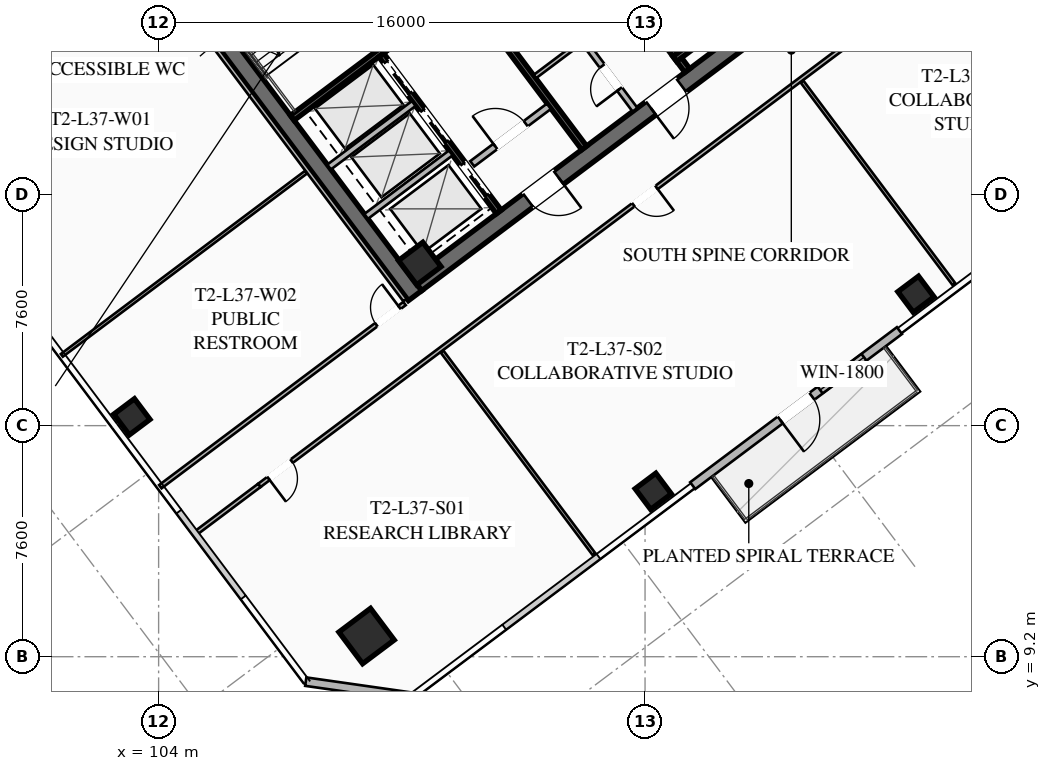
"""IFC4 building model, lengths in metres.
Left out: names, types, materials, properties, quantities, classifications, styles, units other than length and angle.
Written with IfcOpenShell. Run it as: python <this file> out.ifc"""

import sys

from ifc_helpers import new_model, si_unit, direction, frame, frame_2d, origin, origin_2d, place, context, subcontext, project, spatial, rectangle, hollow_rectangle, extrude, element, fill, save


model = new_model("IFC4")
c1 = context("Model", 3, precision=1e-05, world=origin(), true_north=direction((0.0, 1.0)))
c2 = subcontext(c1, "Body", "Model", "MODEL_VIEW")
j1 = project(units=[si_unit("LENGTHUNIT", "METRE"), si_unit("PLANEANGLEUNIT", "RADIAN")], contexts=[c1])
p1 = place(None, origin())
s1 = spatial("IfcSite", under=j1, at=p1, CompositionType="ELEMENT")
p2 = place(p1, origin())
s2 = spatial("IfcBuilding", under=s1, at=p2, CompositionType="ELEMENT")
p3 = place(p2, frame((0.0, 0.0, 139.25)))
s3 = spatial("IfcBuildingStorey", under=s2, at=p3, CompositionType="ELEMENT", Elevation=139.25)
p4 = place(p3, frame((112.436, 21.077, 0.0), z_axis=(0.0, 0.0, 1.0), x_axis=(-0.600005007985, 0.799996243986, 0.0)))
e1 = element("IfcWall", 1, at=p4, inside=s3, PredefinedType="SHEAR", context=c2, shape_type="SweptSolid", body=[
    extrude(rectangle(XDim=15.6, YDim=0.55, at=frame_2d((7.8, 0.0))), origin(), (0.0, 0.0, 1.0), 3.55),
])
p5 = place(p3, frame((124.539, 30.498, 0.0), z_axis=(0.0, 0.0, 1.0), x_axis=(-0.799998054672, -0.600002593761, 0.0)))
e2 = element("IfcWall", 2, at=p5, inside=s3, PredefinedType="SHEAR", context=c2, shape_type="SweptSolid", body=[
    extrude(rectangle(XDim=15.06, YDim=0.55, at=frame_2d((7.53, 0.0))), origin(), (0.0, 0.0, 1.0), 3.55),
])
p6 = place(p5, frame((9.23, 0.0, 0.0)))
e3 = element("IfcOpeningElement", 3, at=p6, cuts=e2, PredefinedType="OPENING", context=c2, shape_type="SweptSolid", body=[
    extrude(rectangle(XDim=1.25, YDim=2.25, at=frame_2d((0.625, 1.125))), frame((0.0, 0.285, 0.0), z_axis=(0.0, -1.0, 0.0), x_axis=(1.0, 0.0, 0.0)), (0.0, 0.0, 1.0), 0.57),
])
p7 = place(p5, frame((4.18, 0.0, 0.0)))
e4 = element("IfcOpeningElement", 4, at=p7, cuts=e2, PredefinedType="OPENING", context=c2, shape_type="SweptSolid", body=[
    extrude(rectangle(XDim=1.25, YDim=2.25, at=frame_2d((0.625, 1.125))), frame((0.0, 0.285, 0.0), z_axis=(0.0, -1.0, 0.0), x_axis=(1.0, 0.0, 0.0)), (0.0, 0.0, 1.0), 0.57),
])
p8 = place(p3, frame((112.59, 22.13, 0.0), z_axis=(0.0, 0.0, 1.0), x_axis=(0.799999996291, 0.600000004945, 0.0)))
e5 = element("IfcColumn", 5, at=p8, inside=s3, PredefinedType="COLUMN", context=c2, shape_type="SweptSolid", body=[
    extrude(hollow_rectangle(XDim=1.0, YDim=1.0, WallThickness=0.04, at=origin_2d()), origin(), (0.0, 0.0, 1.0), 3.37),
])
p9 = place(p3, frame((110.84, 9.88, 0.0), z_axis=(0.0, 0.0, 1.0), x_axis=(0.799999996291, 0.600000004945, 0.0)))
e6 = element("IfcColumn", 6, at=p9, inside=s3, PredefinedType="COLUMN", context=c2, shape_type="SweptSolid", body=[
    extrude(hollow_rectangle(XDim=1.3, YDim=1.3, WallThickness=0.05, at=origin_2d()), origin(), (0.0, 0.0, 1.0), 3.37),
])
for number, where, z_axis, x_axis in (
    (7, (120.27, 14.64, 0.0), (0.0, 0.0, 1.0), (0.8, 0.6, 0.0)),
    (8, (128.91, 21.12, 0.0), (0.0, 0.0, 1.0), (0.8, 0.6, 0.0)),
    (9, (103.12, 17.09, 0.0), (0.0, 0.0, 1.0), (0.8, 0.6, 0.0)),
):
    element("IfcColumn", number, at=place(p3, frame(where, z_axis=z_axis, x_axis=x_axis)), inside=s3, PredefinedType="COLUMN", context=c2, shape_type="SweptSolid", body=[
        extrude(hollow_rectangle(XDim=0.85, YDim=0.85, WallThickness=0.035, at=origin_2d()), origin(), (0.0, 0.0, 1.0), 3.37),
    ])
p10 = place(p3, frame((128.368, 19.926, 0.0), z_axis=(0.0, 0.0, 1.0), x_axis=(-0.799986212866, -0.600018382406, 0.0)))
e10 = element("IfcWall", 10, at=p10, inside=s3, PredefinedType="SOLIDWALL", context=c2, shape_type="SweptSolid", body=[
    extrude(rectangle(XDim=8.5, YDim=0.28, at=frame_2d((4.25, 0.0))), origin(), (0.0, 0.0, 1.0), 3.37),
])
p11 = place(p10, frame((3.6, 0.0, 0.0)))
e11 = element("IfcOpeningElement", 11, at=p11, cuts=e10, PredefinedType="OPENING", context=c2, shape_type="SweptSolid", body=[
    extrude(rectangle(XDim=1.3, YDim=2.15, at=frame_2d((0.65, 1.075))), frame((0.0, 0.15, 0.0), z_axis=(0.0, -1.0, 0.0), x_axis=(1.0, 0.0, 0.0)), (0.0, 0.0, 1.0), 0.3),
])
p12 = place(p10, frame((1.46, 0.0, 0.85)))
e12 = element("IfcOpeningElement", 12, at=p12, cuts=e10, PredefinedType="OPENING", context=c2, shape_type="SweptSolid", body=[
    extrude(rectangle(XDim=1.8, YDim=1.92, at=frame_2d((0.9, 0.96))), frame((0.0, 0.15, 0.0), z_axis=(0.0, -1.0, 0.0), x_axis=(1.0, 0.0, 0.0)), (0.0, 0.0, 1.0), 0.3),
])
p13 = place(p3, frame((112.34, 7.88, 0.0), z_axis=(0.0, 0.0, 1.0), x_axis=(-0.989949493661, 0.141421356237, 0.0)))
e13 = element("IfcWall", 13, at=p13, inside=s3, PredefinedType="SOLIDWALL", context=c2, shape_type="SweptSolid", body=[
    extrude(rectangle(XDim=3.536, YDim=0.28, at=frame_2d((1.768, 0.0))), origin(), (0.0, 0.0, 1.0), 3.37),
])
p14 = place(p3, frame((111.44, 29.08, 0.0), z_axis=(0.0, 0.0, 1.0), x_axis=(-0.59999029481, 0.8000072788, 0.0)))
e14 = element("IfcWall", 14, at=p14, inside=s3, PredefinedType="SHEAR", context=c2, shape_type="SweptSolid", body=[
    extrude(rectangle(XDim=8.05, YDim=0.2, at=frame_2d((4.025, 0.0))), origin(), (0.0, 0.0, 1.0), 3.37),
])
p15 = place(p14, frame((0.45, 0.0, 0.0)))
e15 = element("IfcOpeningElement", 15, at=p15, cuts=e14, PredefinedType="OPENING", context=c2, shape_type="SweptSolid", body=[
    extrude(rectangle(XDim=1.15, YDim=2.2, at=frame_2d((0.575, 1.1))), frame((0.0, 0.11, 0.0), z_axis=(0.0, -1.0, 0.0), x_axis=(1.0, 0.0, 0.0)), (0.0, 0.0, 1.0), 0.22),
])
p16 = place(p3, frame((108.396, 26.922, 0.0), z_axis=(0.0, 0.0, 1.0), x_axis=(0.800015298837, 0.599979601008, 0.0)))
e16 = element("IfcWall", 16, at=p16, inside=s3, PredefinedType="SHEAR", context=c2, shape_type="SweptSolid", body=[
    extrude(rectangle(XDim=3.83, YDim=0.2, at=frame_2d((1.915, 0.0))), origin(), (0.0, 0.0, 1.0), 3.37),
])
p17 = place(p3, frame((116.56, 34.92, 0.0), z_axis=(0.0, 0.0, 1.0), x_axis=(0.59999029481, -0.8000072788, 0.0)))
e17 = element("IfcWall", 17, at=p17, inside=s3, PredefinedType="SHEAR", context=c2, shape_type="SweptSolid", body=[
    extrude(rectangle(XDim=8.05, YDim=0.2, at=frame_2d((4.025, 0.0))), origin(), (0.0, 0.0, 1.0), 3.37),
])
p18 = place(p17, frame((0.45, 0.0, 0.0)))
e18 = element("IfcOpeningElement", 18, at=p18, cuts=e17, PredefinedType="OPENING", context=c2, shape_type="SweptSolid", body=[
    extrude(rectangle(XDim=1.15, YDim=2.2, at=frame_2d((0.575, 1.1))), frame((0.0, 0.11, 0.0), z_axis=(0.0, -1.0, 0.0), x_axis=(1.0, 0.0, 0.0)), (0.0, 0.0, 1.0), 0.22),
])
p19 = place(p3, frame((120.98, 28.86, 0.0), z_axis=(0.0, 0.0, 1.0), x_axis=(0.800015298837, 0.599979601008, 0.0)))
e19 = element("IfcWall", 19, at=p19, inside=s3, PredefinedType="SHEAR", context=c2, shape_type="SweptSolid", body=[
    extrude(rectangle(XDim=3.83, YDim=0.2, at=frame_2d((1.915, 0.0))), origin(), (0.0, 0.0, 1.0), 3.37),
])
p20 = place(p3, frame((117.998, 25.936, 0.0), z_axis=(0.0, 0.0, 1.0), x_axis=(-0.600002693989, 0.799997979501, 0.0)))
e20 = element("IfcWall", 20, at=p20, inside=s3, PredefinedType="SHEAR", context=c2, shape_type="SweptSolid", body=[
    extrude(rectangle(XDim=14.5, YDim=0.2, at=frame_2d((7.25, 0.0))), origin(), (0.0, 0.0, 1.0), 3.37),
])
p21 = place(p3, frame((114.316, 25.412, 0.0), z_axis=(0.0, 0.0, 1.0), x_axis=(0.800018601094, 0.59997519774, 0.0)))
e21 = element("IfcWall", 21, at=p21, inside=s3, PredefinedType="SOLIDWALL", context=c2, shape_type="SweptSolid", body=[
    extrude(rectangle(XDim=3.15, YDim=0.22, at=frame_2d((1.575, 0.0))), origin(), (0.0, 0.0, 1.0), 2.723),
])
p22 = place(p21, frame((0.95, 0.0, 0.0)))
e22 = element("IfcOpeningElement", 22, at=p22, cuts=e21, PredefinedType="OPENING", context=c2, shape_type="SweptSolid", body=[
    extrude(rectangle(XDim=1.25, YDim=2.25, at=frame_2d((0.625, 1.125))), frame((0.0, 0.12, 0.0), z_axis=(0.0, -1.0, 0.0), x_axis=(1.0, 0.0, 0.0)), (0.0, 0.0, 1.0), 0.24),
])
p23 = place(p3, frame((115.19, 23.83, 0.0), z_axis=(0.0, 0.0, 1.0), x_axis=(-0.599993943644, 0.800004542231, 0.0)))
e23 = element("IfcWall", 23, at=p23, inside=s3, PredefinedType="SHEAR", context=c2, shape_type="SweptSolid", body=[
    extrude(rectangle(XDim=6.45, YDim=0.2, at=frame_2d((3.225, 0.0))), origin(), (0.0, 0.0, 1.0), 3.37),
])
p24 = place(p23, frame((4.875, 0.0, 0.0)))
e24 = element("IfcOpeningElement", 24, at=p24, cuts=e23, PredefinedType="OPENING", context=c2, shape_type="SweptSolid", body=[
    extrude(rectangle(XDim=1.3, YDim=2.25, at=frame_2d((0.65, 1.125))), frame((0.0, 0.11, 0.0), z_axis=(0.0, -1.0, 0.0), x_axis=(1.0, 0.0, 0.0)), (0.0, 0.0, 1.0), 0.22),
])
p25 = place(p23, frame((2.875, 0.0, 0.0)))
e25 = element("IfcOpeningElement", 25, at=p25, cuts=e23, PredefinedType="OPENING", context=c2, shape_type="SweptSolid", body=[
    extrude(rectangle(XDim=1.3, YDim=2.25, at=frame_2d((0.65, 1.125))), frame((0.0, 0.11, 0.0), z_axis=(0.0, -1.0, 0.0), x_axis=(1.0, 0.0, 0.0)), (0.0, 0.0, 1.0), 0.22),
])
p26 = place(p23, frame((0.675, 0.0, 0.0)))
e26 = element("IfcOpeningElement", 26, at=p26, cuts=e23, PredefinedType="OPENING", context=c2, shape_type="SweptSolid", body=[
    extrude(rectangle(XDim=1.3, YDim=2.25, at=frame_2d((0.65, 1.125))), frame((0.0, 0.11, 0.0), z_axis=(0.0, -1.0, 0.0), x_axis=(1.0, 0.0, 0.0)), (0.0, 0.0, 1.0), 0.22),
])
for number, where, z_axis, x_axis in (
    (27, (110.826, 23.682, 0.0), (0.0, 0.0, 1.0), (0.8, 0.6, 0.0)),
    (28, (109.608, 25.306, 0.0), (0.0, 0.0, 1.0), (0.8, 0.6, 0.0)),
):
    element("IfcWall", number, at=place(p3, frame(where, z_axis=z_axis, x_axis=x_axis)), inside=s3, PredefinedType="SOLIDWALL", context=c2, shape_type="SweptSolid", body=[
        extrude(rectangle(XDim=3.48, YDim=0.2, at=frame_2d((1.74, 0.0))), origin(), (0.0, 0.0, 1.0), 3.37),
    ])
p27 = place(p3, frame((119.67, 27.19, 0.0), z_axis=(0.0, 0.0, 1.0), x_axis=(-0.599988677396, 0.800008491828, 0.0)))
e29 = element("IfcWall", 29, at=p27, inside=s3, PredefinedType="SOLIDWALL", context=c2, shape_type="SweptSolid", body=[
    extrude(rectangle(XDim=6.9, YDim=0.2, at=frame_2d((3.45, 0.0))), origin(), (0.0, 0.0, 1.0), 2.723),
])
p28 = place(p27, frame((0.85, 0.0, 0.0)))
e30 = element("IfcOpeningElement", 30, at=p28, cuts=e29, PredefinedType="OPENING", context=c2, shape_type="SweptSolid", body=[
    extrude(rectangle(XDim=0.95, YDim=2.05, at=frame_2d((0.475, 1.025))), frame((0.0, 0.11, 0.0), z_axis=(0.0, -1.0, 0.0), x_axis=(1.0, 0.0, 0.0)), (0.0, 0.0, 1.0), 0.22),
])
p29 = place(p27, frame((4.8, 0.0, 0.0)))
e31 = element("IfcOpeningElement", 31, at=p29, cuts=e29, PredefinedType="OPENING", context=c2, shape_type="SweptSolid", body=[
    extrude(rectangle(XDim=1.05, YDim=2.2, at=frame_2d((0.525, 1.1))), frame((0.0, 0.11, 0.0), z_axis=(0.0, -1.0, 0.0), x_axis=(1.0, 0.0, 0.0)), (0.0, 0.0, 1.0), 0.22),
])
p30 = place(p3, frame((116.376, 28.282, 0.0), z_axis=(0.0, 0.0, 1.0), x_axis=(0.8, 0.6, 0.0)))
e32 = element("IfcWall", 32, at=p30, inside=s3, PredefinedType="PARTITIONING", context=c2, shape_type="SweptSolid", body=[
    extrude(rectangle(XDim=1.88, YDim=0.135, at=frame_2d((0.94, 0.0))), origin(), (0.0, 0.0, 1.0), 2.723),
])
p31 = place(p3, frame((132.352, 33.614, 0.0), z_axis=(0.0, 0.0, 1.0), x_axis=(-0.8, -0.6, 0.0)))
e33 = element("IfcWall", 33, at=p31, inside=s3, PredefinedType="PARTITIONING", context=c2, shape_type="SweptSolid", body=[
    extrude(rectangle(XDim=31.3, YDim=0.135, at=frame_2d((15.65, 0.0))), origin(), (0.0, 0.0, 1.0), 2.723),
])
p32 = place(p31, frame((29.97, 0.0, 0.0)))
e34 = element("IfcOpeningElement", 34, at=p32, cuts=e33, PredefinedType="OPENING", context=c2, shape_type="SweptSolid", body=[
    extrude(rectangle(XDim=0.95, YDim=2.05, at=frame_2d((0.475, 1.025))), frame((0.0, 0.077, 0.0), z_axis=(0.0, -1.0, 0.0), x_axis=(1.0, 0.0, 0.0)), (0.0, 0.0, 1.0), 0.155),
])
p33 = place(p31, frame((14.968, 0.0, 0.0)))
e35 = element("IfcOpeningElement", 35, at=p33, cuts=e33, PredefinedType="OPENING", context=c2, shape_type="SweptSolid", body=[
    extrude(rectangle(XDim=0.95, YDim=2.05, at=frame_2d((0.475, 1.025))), frame((0.0, 0.077, 0.0), z_axis=(0.0, -1.0, 0.0), x_axis=(1.0, 0.0, 0.0)), (0.0, 0.0, 1.0), 0.155),
])
p34 = place(p31, frame((0.38, 0.0, 0.0)))
e36 = element("IfcOpeningElement", 36, at=p34, cuts=e33, PredefinedType="OPENING", context=c2, shape_type="SweptSolid", body=[
    extrude(rectangle(XDim=0.95, YDim=2.05, at=frame_2d((0.475, 1.025))), frame((0.0, 0.077, 0.0), z_axis=(0.0, -1.0, 0.0), x_axis=(1.0, 0.0, 0.0)), (0.0, 0.0, 1.0), 0.155),
])
p35 = place(p3, frame((105.208, 13.256, 0.0), z_axis=(0.0, 0.0, 1.0), x_axis=(0.80002227902, 0.599970293491, 0.0)))
e37 = element("IfcWall", 37, at=p35, inside=s3, PredefinedType="PARTITIONING", context=c2, shape_type="SweptSolid", body=[
    extrude(rectangle(XDim=2.63, YDim=0.135, at=frame_2d((1.315, 0.0))), origin(), (0.0, 0.0, 1.0), 2.723),
])
for number, where, z_axis, x_axis in (
    (38, (118.318, 12.576, 0.0), (0.0, 0.0, 1.0), (-0.6, 0.8, 0.0)),
    (39, (130.158, 21.456, 0.0), (0.0, 0.0, 1.0), (-0.6, 0.8, 0.0)),
):
    element("IfcWall", number, at=place(p3, frame(where, z_axis=z_axis, x_axis=x_axis)), inside=s3, PredefinedType="PARTITIONING", context=c2, shape_type="SweptSolid", body=[
        extrude(rectangle(XDim=8.33, YDim=0.11, at=frame_2d((4.165, 0.0))), origin(), (0.0, 0.0, 1.0), 2.723),
    ])
p36 = place(p3, frame((112.104, 20.928, 0.0), z_axis=(0.0, 0.0, 1.0), x_axis=(-0.599994940075, 0.800003794918, 0.0)))
e40 = element("IfcWall", 40, at=p36, inside=s3, PredefinedType="PARTITIONING", context=c2, shape_type="SweptSolid", body=[
    extrude(rectangle(XDim=15.44, YDim=0.135, at=frame_2d((7.72, 0.0))), origin(), (0.0, 0.0, 1.0), 2.723),
])
p37 = place(p3, frame((102.728, 33.296, 0.0), z_axis=(0.0, 0.0, 1.0), x_axis=(-0.800002918023, -0.599996109283, 0.0)))
e41 = element("IfcWall", 41, at=p37, inside=s3, PredefinedType="PARTITIONING", context=c2, shape_type="SweptSolid", body=[
    extrude(rectangle(XDim=10.04, YDim=0.135, at=frame_2d((5.02, 0.0))), origin(), (0.0, 0.0, 1.0), 2.723),
])
p38 = place(p37, frame((0.5, 0.0, 0.0)))
e42 = element("IfcOpeningElement", 42, at=p38, cuts=e41, PredefinedType="OPENING", context=c2, shape_type="SweptSolid", body=[
    extrude(rectangle(XDim=0.95, YDim=2.05, at=frame_2d((0.475, 1.025))), frame((0.0, 0.077, 0.0), z_axis=(0.0, -1.0, 0.0), x_axis=(1.0, 0.0, 0.0)), (0.0, 0.0, 1.0), 0.155),
])
p39 = place(p3, frame((104.056, 14.792, 0.0), z_axis=(0.0, 0.0, 1.0), x_axis=(0.800002918023, 0.599996109283, 0.0)))
e43 = element("IfcWall", 43, at=p39, inside=s3, PredefinedType="PARTITIONING", context=c2, shape_type="SweptSolid", body=[
    extrude(rectangle(XDim=10.04, YDim=0.135, at=frame_2d((5.02, 0.0))), origin(), (0.0, 0.0, 1.0), 2.723),
])
p40 = place(p39, frame((8.88, 0.0, 0.0)))
e44 = element("IfcOpeningElement", 44, at=p40, cuts=e43, PredefinedType="OPENING", context=c2, shape_type="SweptSolid", body=[
    extrude(rectangle(XDim=0.95, YDim=2.05, at=frame_2d((0.475, 1.025))), frame((0.0, 0.077, 0.0), z_axis=(0.0, -1.0, 0.0), x_axis=(1.0, 0.0, 0.0)), (0.0, 0.0, 1.0), 0.155),
])
p41 = place(p3, frame((100.816, 19.112, 0.0), z_axis=(0.0, 0.0, 1.0), x_axis=(0.800002918023, 0.599996109283, 0.0)))
e45 = element("IfcWall", 45, at=p41, inside=s3, PredefinedType="PARTITIONING", context=c2, shape_type="SweptSolid", body=[
    extrude(rectangle(XDim=10.04, YDim=0.11, at=frame_2d((5.02, 0.0))), origin(), (0.0, 0.0, 1.0), 2.723),
])
p42 = place(p11, origin())
e46 = element("IfcDoor", 46, at=p42, inside=s3, OperationType="SINGLE_SWING_RIGHT", PredefinedType="DOOR", context=c2, shape_type="SweptSolid", body=[
    extrude(rectangle(XDim=1.3, YDim=2.15, at=frame_2d((0.65, 1.075))), frame((0.0, 0.025, 0.0), z_axis=(0.0, -1.0, 0.0), x_axis=(1.0, 0.0, 0.0)), (0.0, 0.0, 1.0), 0.05),
])
fill(e11, e46)
p43 = place(p12, origin())
e47 = element("IfcWindow", 47, at=p43, inside=s3, PartitioningType="SINGLE_PANEL", PredefinedType="WINDOW", context=c2, shape_type="SweptSolid", body=[
    extrude(rectangle(XDim=1.8, YDim=1.92, at=frame_2d((0.9, 0.96))), frame((0.0, 0.03, 0.0), z_axis=(0.0, -1.0, 0.0), x_axis=(1.0, 0.0, 0.0)), (0.0, 0.0, 1.0), 0.06),
])
fill(e12, e47)
p44 = place(p6, origin())
e48 = element("IfcDoor", 48, at=p44, inside=s3, OperationType="SINGLE_SWING_LEFT", PredefinedType="DOOR", context=c2, shape_type="SweptSolid", body=[
    extrude(rectangle(XDim=1.25, YDim=2.25, at=frame_2d((0.625, 1.125))), frame((0.0, 0.025, 0.0), z_axis=(0.0, -1.0, 0.0), x_axis=(1.0, 0.0, 0.0)), (0.0, 0.0, 1.0), 0.05),
])
fill(e3, e48)
p45 = place(p7, origin())
e49 = element("IfcDoor", 49, at=p45, inside=s3, OperationType="SINGLE_SWING_RIGHT", PredefinedType="DOOR", context=c2, shape_type="SweptSolid", body=[
    extrude(rectangle(XDim=1.25, YDim=2.25, at=frame_2d((0.625, 1.125))), frame((0.0, 0.025, 0.0), z_axis=(0.0, -1.0, 0.0), x_axis=(1.0, 0.0, 0.0)), (0.0, 0.0, 1.0), 0.05),
])
fill(e4, e49)
p46 = place(p22, origin())
e50 = element("IfcDoor", 50, at=p46, inside=s3, OperationType="SINGLE_SWING_LEFT", PredefinedType="DOOR", context=c2, shape_type="SweptSolid", body=[
    extrude(rectangle(XDim=1.25, YDim=2.25, at=frame_2d((0.625, 1.125))), frame((0.0, 0.025, 0.0), z_axis=(0.0, -1.0, 0.0), x_axis=(1.0, 0.0, 0.0)), (0.0, 0.0, 1.0), 0.05),
])
fill(e22, e50)
p47 = place(p28, origin())
e51 = element("IfcDoor", 51, at=p47, inside=s3, OperationType="SINGLE_SWING_LEFT", PredefinedType="DOOR", context=c2, shape_type="SweptSolid", body=[
    extrude(rectangle(XDim=0.95, YDim=2.05, at=frame_2d((0.475, 1.025))), frame((0.0, 0.025, 0.0), z_axis=(0.0, -1.0, 0.0), x_axis=(1.0, 0.0, 0.0)), (0.0, 0.0, 1.0), 0.05),
])
fill(e30, e51)
p48 = place(p32, origin())
e52 = element("IfcDoor", 52, at=p48, inside=s3, OperationType="SINGLE_SWING_RIGHT", PredefinedType="DOOR", context=c2, shape_type="SweptSolid", body=[
    extrude(rectangle(XDim=0.95, YDim=2.05, at=frame_2d((0.475, 1.025))), frame((0.0, 0.025, 0.0), z_axis=(0.0, -1.0, 0.0), x_axis=(1.0, 0.0, 0.0)), (0.0, 0.0, 1.0), 0.05),
])
fill(e34, e52)
p49 = place(p33, origin())
e53 = element("IfcDoor", 53, at=p49, inside=s3, OperationType="SINGLE_SWING_LEFT", PredefinedType="DOOR", context=c2, shape_type="SweptSolid", body=[
    extrude(rectangle(XDim=0.95, YDim=2.05, at=frame_2d((0.475, 1.025))), frame((0.0, 0.025, 0.0), z_axis=(0.0, -1.0, 0.0), x_axis=(1.0, 0.0, 0.0)), (0.0, 0.0, 1.0), 0.05),
])
fill(e35, e53)
p50 = place(p40, origin())
e54 = element("IfcDoor", 54, at=p50, inside=s3, OperationType="SINGLE_SWING_RIGHT", PredefinedType="DOOR", context=c2, shape_type="SweptSolid", body=[
    extrude(rectangle(XDim=0.95, YDim=2.05, at=frame_2d((0.475, 1.025))), frame((0.0, 0.025, 0.0), z_axis=(0.0, -1.0, 0.0), x_axis=(1.0, 0.0, 0.0)), (0.0, 0.0, 1.0), 0.05),
])
fill(e44, e54)
p51 = place(p24, origin())
e55 = element("IfcDoor", 55, at=p51, inside=s3, OperationType="SLIDING_TO_LEFT", PredefinedType="DOOR", context=c2, shape_type="SweptSolid", body=[
    extrude(rectangle(XDim=1.3, YDim=2.25, at=frame_2d((0.65, 1.125))), frame((0.0, 0.025, 0.0), z_axis=(0.0, -1.0, 0.0), x_axis=(1.0, 0.0, 0.0)), (0.0, 0.0, 1.0), 0.05),
])
fill(e24, e55)
p52 = place(p25, origin())
e56 = element("IfcDoor", 56, at=p52, inside=s3, OperationType="SLIDING_TO_LEFT", PredefinedType="DOOR", context=c2, shape_type="SweptSolid", body=[
    extrude(rectangle(XDim=1.3, YDim=2.25, at=frame_2d((0.65, 1.125))), frame((0.0, 0.025, 0.0), z_axis=(0.0, -1.0, 0.0), x_axis=(1.0, 0.0, 0.0)), (0.0, 0.0, 1.0), 0.05),
])
fill(e25, e56)
p53 = place(p26, origin())
e57 = element("IfcDoor", 57, at=p53, inside=s3, OperationType="SLIDING_TO_LEFT", PredefinedType="DOOR", context=c2, shape_type="SweptSolid", body=[
    extrude(rectangle(XDim=1.3, YDim=2.25, at=frame_2d((0.65, 1.125))), frame((0.0, 0.025, 0.0), z_axis=(0.0, -1.0, 0.0), x_axis=(1.0, 0.0, 0.0)), (0.0, 0.0, 1.0), 0.05),
])
fill(e26, e57)
save(model, sys.argv[1])
